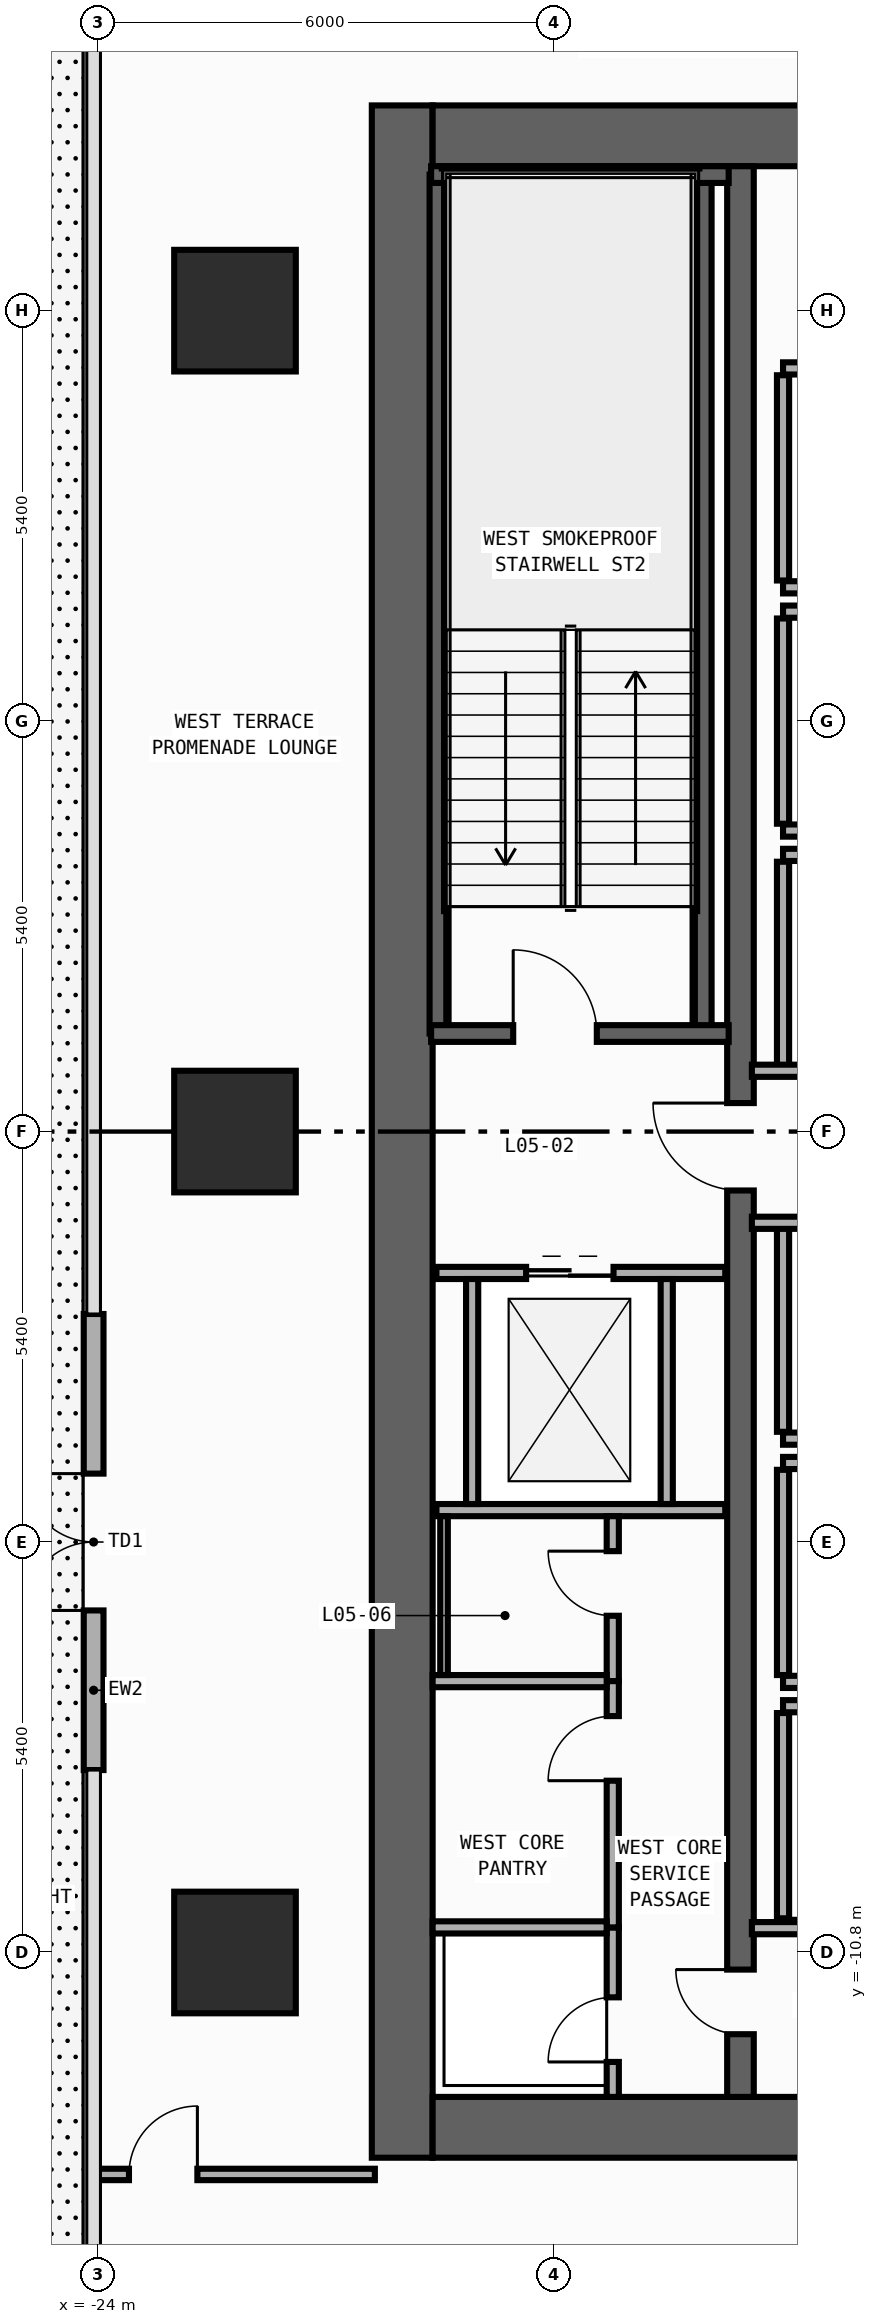
"""IFC4 building model, lengths in metres.
Left out: names, types, materials, properties, quantities, classifications, styles, units other than length and angle.
Written with IfcOpenShell. Run it as: python <this file> out.ifc"""

import sys

from ifc_helpers import new_model, si_unit, direction, frame, frame_2d, origin, origin_2d, place, context, subcontext, project, spatial, rectangle, extrude, element, fill, save


model = new_model("IFC4")
c1 = context("Model", 3, precision=1e-05, world=origin(), true_north=direction((0.0, 1.0)))
c2 = subcontext(c1, "Body", "Model", "MODEL_VIEW")
j1 = project(units=[si_unit("LENGTHUNIT", "METRE"), si_unit("PLANEANGLEUNIT", "RADIAN")], contexts=[c1])
p1 = place(None, origin())
s1 = spatial("IfcSite", under=j1, at=p1, CompositionType="ELEMENT")
p2 = place(p1, origin())
s2 = spatial("IfcBuilding", under=s1, at=p2, CompositionType="ELEMENT")
p3 = place(p2, frame((0.0, 0.0, 21.0)))
s3 = spatial("IfcBuildingStorey", under=s2, at=p3, CompositionType="ELEMENT", Elevation=21.0)
p4 = place(p3, frame((-20.0, -13.5, 0.0), z_axis=(0.0, 0.0, 1.0), x_axis=(0.0, 1.0, 0.0)))
e1 = element("IfcWall", 1, at=p4, inside=s3, PredefinedType="SHEAR", context=c2, shape_type="SweptSolid", body=[
    extrude(rectangle(XDim=27.0, YDim=0.8, at=frame_2d((13.5, 0.0))), origin(), (0.0, 0.0, 1.0), 4.74),
])
for number, where, z_axis, x_axis in (
    (2, (-19.6, -13.1, 0.0), (0.0, 0.0, 1.0), (1.0, 0.0, 0.0)),
    (3, (-19.6, 13.1, 0.0), (0.0, 0.0, 1.0), (1.0, 0.0, 0.0)),
):
    element("IfcWall", number, at=place(p3, frame(where, z_axis=z_axis, x_axis=x_axis)), inside=s3, PredefinedType="SHEAR", context=c2, shape_type="SweptSolid", body=[
        extrude(rectangle(XDim=6.8, YDim=0.8, at=frame_2d((3.4, 0.0))), origin(), (0.0, 0.0, 1.0), 4.74),
    ])
p5 = place(p3, frame((-15.55, -12.7, 0.0), z_axis=(0.0, 0.0, 1.0), x_axis=(0.0, 1.0, 0.0)))
e4 = element("IfcWall", 4, at=p5, inside=s3, PredefinedType="SHEAR", context=c2, shape_type="SweptSolid", body=[
    extrude(rectangle(XDim=25.4, YDim=0.35, at=frame_2d((12.7, 0.0))), origin(), (0.0, 0.0, 1.0), 4.74),
])
p6 = place(p5, frame((11.925, 0.0, 0.0)))
e5 = element("IfcOpeningElement", 5, at=p6, cuts=e4, PredefinedType="OPENING", context=c2, shape_type="SweptSolid", body=[
    extrude(rectangle(XDim=1.15, YDim=2.2, at=frame_2d((0.575, 1.1))), frame((0.0, 0.185, 0.0), z_axis=(0.0, -1.0, 0.0), x_axis=(1.0, 0.0, 0.0)), (0.0, 0.0, 1.0), 0.37),
])
p7 = place(p5, frame((0.825, 0.0, 0.0)))
e6 = element("IfcOpeningElement", 6, at=p7, cuts=e4, PredefinedType="OPENING", context=c2, shape_type="SweptSolid", body=[
    extrude(rectangle(XDim=0.85, YDim=2.1, at=frame_2d((0.425, 1.05))), frame((0.0, 0.185, 0.0), z_axis=(0.0, -1.0, 0.0), x_axis=(1.0, 0.0, 0.0)), (0.0, 0.0, 1.0), 0.37),
])
for number, where, z_axis, x_axis in (
    (7, (-16.04, 1.29, 0.0), (0.0, 0.0, 1.0), (0.0, 1.0, 0.0)),
    (8, (-19.53, 1.29, 0.0), (0.0, 0.0, 1.0), (0.0, 1.0, 0.0)),
):
    element("IfcWall", number, at=place(p3, frame(where, z_axis=z_axis, x_axis=x_axis)), inside=s3, PredefinedType="SHEAR", context=c2, shape_type="SweptSolid", body=[
        extrude(rectangle(XDim=11.3, YDim=0.22, at=frame_2d((5.65, 0.0))), origin(), (0.0, 0.0, 1.0), 4.74),
    ])
p8 = place(p3, frame((-19.62, 12.59, 0.0), z_axis=(0.0, 0.0, 1.0), x_axis=(1.0, 0.0, 0.0)))
e9 = element("IfcWall", 9, at=p8, inside=s3, PredefinedType="SHEAR", context=c2, shape_type="SweptSolid", body=[
    extrude(rectangle(XDim=3.915, YDim=0.22, at=frame_2d((1.958, 0.0))), origin(), (0.0, 0.0, 1.0), 4.74),
])
p9 = place(p3, frame((-19.62, 1.29, 0.0), z_axis=(0.0, 0.0, 1.0), x_axis=(1.0, 0.0, 0.0)))
e10 = element("IfcWall", 10, at=p9, inside=s3, PredefinedType="SHEAR", context=c2, shape_type="SweptSolid", body=[
    extrude(rectangle(XDim=3.915, YDim=0.22, at=frame_2d((1.958, 0.0))), origin(), (0.0, 0.0, 1.0), 4.74),
])
p10 = place(p9, frame((1.08, 0.0, 0.0)))
e11 = element("IfcOpeningElement", 11, at=p10, cuts=e10, PredefinedType="OPENING", context=c2, shape_type="SweptSolid", body=[
    extrude(rectangle(XDim=1.1, YDim=2.2, at=frame_2d((0.55, 1.1))), frame((0.0, 0.12, 0.0), z_axis=(0.0, -1.0, 0.0), x_axis=(1.0, 0.0, 0.0)), (0.0, 0.0, 1.0), 0.24),
])
for number, where, z_axis, x_axis in (
    (12, (-22.2, -10.8, 0.0), (0.0, 0.0, 1.0), (1.0, 0.0, 0.0)),
    (13, (-22.2, 0.0, 0.0), (0.0, 0.0, 1.0), (1.0, 0.0, 0.0)),
    (14, (-22.2, 10.8, 0.0), (0.0, 0.0, 1.0), (1.0, 0.0, 0.0)),
):
    element("IfcColumn", number, at=place(p3, frame(where, z_axis=z_axis, x_axis=x_axis)), inside=s3, PredefinedType="COLUMN", context=c2, shape_type="SweptSolid", body=[
        extrude(rectangle(XDim=1.6, YDim=1.6, at=origin_2d()), origin(), (0.0, 0.0, 1.0), 5.0),
    ])
p11 = place(p3, frame((-24.06, -8.4, 0.0), z_axis=(0.0, 0.0, 1.0), x_axis=(0.0, 1.0, 0.0)))
e15 = element("IfcWall", 15, at=p11, inside=s3, PredefinedType="STANDARD", context=c2, shape_type="SweptSolid", body=[
    extrude(rectangle(XDim=6.0, YDim=0.26, at=frame_2d((3.0, 0.0))), origin(), (0.0, 0.0, 1.0), 4.74),
])
p12 = place(p11, frame((2.1, 0.0, 0.0)))
e16 = element("IfcOpeningElement", 16, at=p12, cuts=e15, PredefinedType="OPENING", context=c2, shape_type="SweptSolid", body=[
    extrude(rectangle(XDim=1.8, YDim=2.3, at=frame_2d((0.9, 1.15))), frame((0.0, 0.14, 0.0), z_axis=(0.0, -1.0, 0.0), x_axis=(1.0, 0.0, 0.0)), (0.0, 0.0, 1.0), 0.28),
])
for number, where, z_axis, x_axis in (
    (17, (-14.99, 7.16, 0.0), (0.0, 0.0, 1.0), (1.0, 0.0, 0.0)),
    (18, (-14.99, 10.04, 0.0), (0.0, 0.0, 1.0), (1.0, 0.0, 0.0)),
):
    element("IfcWall", number, at=place(p3, frame(where, z_axis=z_axis, x_axis=x_axis)), inside=s3, PredefinedType="STANDARD", context=c2, shape_type="SweptSolid", body=[
        extrude(rectangle(XDim=2.19, YDim=0.16, at=frame_2d((1.095, 0.0))), origin(), (0.0, 0.0, 1.0), 4.74),
    ])
p13 = place(p3, frame((-14.99, 7.25, 0.0), z_axis=(0.0, 0.0, 1.0), x_axis=(0.0, 1.0, 0.0)))
e19 = element("IfcWall", 19, at=p13, inside=s3, PredefinedType="STANDARD", context=c2, shape_type="SweptSolid", body=[
    extrude(rectangle(XDim=2.7, YDim=0.16, at=frame_2d((1.35, 0.0))), origin(), (0.0, 0.0, 1.0), 4.74),
])
for number, where, z_axis, x_axis in (
    (20, (-14.99, 3.96, 0.0), (0.0, 0.0, 1.0), (1.0, 0.0, 0.0)),
    (21, (-14.99, 6.84, 0.0), (0.0, 0.0, 1.0), (1.0, 0.0, 0.0)),
):
    element("IfcWall", number, at=place(p3, frame(where, z_axis=z_axis, x_axis=x_axis)), inside=s3, PredefinedType="STANDARD", context=c2, shape_type="SweptSolid", body=[
        extrude(rectangle(XDim=2.19, YDim=0.16, at=frame_2d((1.095, 0.0))), origin(), (0.0, 0.0, 1.0), 4.74),
    ])
p14 = place(p3, frame((-14.99, 4.05, 0.0), z_axis=(0.0, 0.0, 1.0), x_axis=(0.0, 1.0, 0.0)))
e22 = element("IfcWall", 22, at=p14, inside=s3, PredefinedType="STANDARD", context=c2, shape_type="SweptSolid", body=[
    extrude(rectangle(XDim=2.7, YDim=0.16, at=frame_2d((1.35, 0.0))), origin(), (0.0, 0.0, 1.0), 4.74),
])
p15 = place(p3, frame((-14.99, 3.64, 0.0), z_axis=(0.0, 0.0, 1.0), x_axis=(1.0, 0.0, 0.0)))
e23 = element("IfcWall", 23, at=p15, inside=s3, PredefinedType="STANDARD", context=c2, shape_type="SweptSolid", body=[
    extrude(rectangle(XDim=2.19, YDim=0.16, at=frame_2d((1.095, 0.0))), origin(), (0.0, 0.0, 1.0), 4.74),
])
p16 = place(p3, frame((-14.99, 0.85, 0.0), z_axis=(0.0, 0.0, 1.0), x_axis=(0.0, 1.0, 0.0)))
e24 = element("IfcWall", 24, at=p16, inside=s3, PredefinedType="STANDARD", context=c2, shape_type="SweptSolid", body=[
    extrude(rectangle(XDim=2.7, YDim=0.16, at=frame_2d((1.35, 0.0))), origin(), (0.0, 0.0, 1.0), 4.74),
])
p17 = place(p3, frame((-14.99, -4.04, 0.0), z_axis=(0.0, 0.0, 1.0), x_axis=(1.0, 0.0, 0.0)))
e25 = element("IfcWall", 25, at=p17, inside=s3, PredefinedType="STANDARD", context=c2, shape_type="SweptSolid", body=[
    extrude(rectangle(XDim=2.19, YDim=0.16, at=frame_2d((1.095, 0.0))), origin(), (0.0, 0.0, 1.0), 4.74),
])
p18 = place(p3, frame((-14.99, -3.95, 0.0), z_axis=(0.0, 0.0, 1.0), x_axis=(0.0, 1.0, 0.0)))
e26 = element("IfcWall", 26, at=p18, inside=s3, PredefinedType="STANDARD", context=c2, shape_type="SweptSolid", body=[
    extrude(rectangle(XDim=2.7, YDim=0.16, at=frame_2d((1.35, 0.0))), origin(), (0.0, 0.0, 1.0), 4.74),
])
for number, where, z_axis, x_axis in (
    (27, (-14.99, -7.24, 0.0), (0.0, 0.0, 1.0), (1.0, 0.0, 0.0)),
    (28, (-14.99, -4.36, 0.0), (0.0, 0.0, 1.0), (1.0, 0.0, 0.0)),
):
    element("IfcWall", number, at=place(p3, frame(where, z_axis=z_axis, x_axis=x_axis)), inside=s3, PredefinedType="STANDARD", context=c2, shape_type="SweptSolid", body=[
        extrude(rectangle(XDim=2.19, YDim=0.16, at=frame_2d((1.095, 0.0))), origin(), (0.0, 0.0, 1.0), 4.74),
    ])
p19 = place(p3, frame((-14.99, -7.15, 0.0), z_axis=(0.0, 0.0, 1.0), x_axis=(0.0, 1.0, 0.0)))
e29 = element("IfcWall", 29, at=p19, inside=s3, PredefinedType="STANDARD", context=c2, shape_type="SweptSolid", body=[
    extrude(rectangle(XDim=2.7, YDim=0.16, at=frame_2d((1.35, 0.0))), origin(), (0.0, 0.0, 1.0), 4.74),
])
p20 = place(p3, frame((-14.99, -7.56, 0.0), z_axis=(0.0, 0.0, 1.0), x_axis=(1.0, 0.0, 0.0)))
e30 = element("IfcWall", 30, at=p20, inside=s3, PredefinedType="STANDARD", context=c2, shape_type="SweptSolid", body=[
    extrude(rectangle(XDim=2.19, YDim=0.16, at=frame_2d((1.095, 0.0))), origin(), (0.0, 0.0, 1.0), 4.74),
])
p21 = place(p3, frame((-14.99, -10.35, 0.0), z_axis=(0.0, 0.0, 1.0), x_axis=(0.0, 1.0, 0.0)))
e31 = element("IfcWall", 31, at=p21, inside=s3, PredefinedType="STANDARD", context=c2, shape_type="SweptSolid", body=[
    extrude(rectangle(XDim=2.7, YDim=0.16, at=frame_2d((1.35, 0.0))), origin(), (0.0, 0.0, 1.0), 4.74),
])
p22 = place(p3, frame((-19.55, -1.86, 0.0), z_axis=(0.0, 0.0, 1.0), x_axis=(1.0, 0.0, 0.0)))
e32 = element("IfcWall", 32, at=p22, inside=s3, PredefinedType="STANDARD", context=c2, shape_type="SweptSolid", body=[
    extrude(rectangle(XDim=3.8, YDim=0.16, at=frame_2d((1.9, 0.0))), origin(), (0.0, 0.0, 1.0), 4.74),
])
p23 = place(p22, frame((1.18, 0.0, 0.0)))
e33 = element("IfcOpeningElement", 33, at=p23, cuts=e32, PredefinedType="OPENING", context=c2, shape_type="SweptSolid", body=[
    extrude(rectangle(XDim=1.15, YDim=2.2, at=frame_2d((0.575, 1.1))), frame((0.0, 0.09, 0.0), z_axis=(0.0, -1.0, 0.0), x_axis=(1.0, 0.0, 0.0)), (0.0, 0.0, 1.0), 0.18),
])
p24 = place(p3, frame((-19.55, -4.98, 0.0), z_axis=(0.0, 0.0, 1.0), x_axis=(1.0, 0.0, 0.0)))
e34 = element("IfcWall", 34, at=p24, inside=s3, PredefinedType="STANDARD", context=c2, shape_type="SweptSolid", body=[
    extrude(rectangle(XDim=3.8, YDim=0.16, at=frame_2d((1.9, 0.0))), origin(), (0.0, 0.0, 1.0), 4.74),
])
for number, where, z_axis, x_axis in (
    (35, (-19.08, -4.9, 0.0), (0.0, 0.0, 1.0), (0.0, 1.0, 0.0)),
    (36, (-16.52, -4.9, 0.0), (0.0, 0.0, 1.0), (0.0, 1.0, 0.0)),
):
    element("IfcWall", number, at=place(p3, frame(where, z_axis=z_axis, x_axis=x_axis)), inside=s3, PredefinedType="STANDARD", context=c2, shape_type="SweptSolid", body=[
        extrude(rectangle(XDim=2.96, YDim=0.16, at=frame_2d((1.48, 0.0))), origin(), (0.0, 0.0, 1.0), 4.74),
    ])
for number, where, z_axis, x_axis in (
    (37, (-15.4, 0.8, 0.0), (0.0, 0.0, 1.0), (1.0, 0.0, 0.0)),
    (38, (-15.4, -1.2, 0.0), (0.0, 0.0, 1.0), (1.0, 0.0, 0.0)),
    (39, (-15.4, -10.48, 0.0), (0.0, 0.0, 1.0), (1.0, 0.0, 0.0)),
):
    element("IfcWall", number, at=place(p3, frame(where, z_axis=z_axis, x_axis=x_axis)), inside=s3, PredefinedType="STANDARD", context=c2, shape_type="SweptSolid", body=[
        extrude(rectangle(XDim=2.6, YDim=0.16, at=frame_2d((1.3, 0.0))), origin(), (0.0, 0.0, 1.0), 4.74),
    ])
p25 = place(p3, frame((-17.23, -12.7, 0.0), z_axis=(0.0, 0.0, 1.0), x_axis=(0.0, 1.0, 0.0)))
e40 = element("IfcWall", 40, at=p25, inside=s3, PredefinedType="PARTITIONING", context=c2, shape_type="SweptSolid", body=[
    extrude(rectangle(XDim=2.23, YDim=0.16, at=frame_2d((1.115, 0.0))), origin(), (0.0, 0.0, 1.0), 4.74),
])
p26 = place(p25, frame((0.46, 0.0, 0.0)))
e41 = element("IfcOpeningElement", 41, at=p26, cuts=e40, PredefinedType="OPENING", context=c2, shape_type="SweptSolid", body=[
    extrude(rectangle(XDim=0.85, YDim=2.1, at=frame_2d((0.425, 1.05))), frame((0.0, 0.09, 0.0), z_axis=(0.0, -1.0, 0.0), x_axis=(1.0, 0.0, 0.0)), (0.0, 0.0, 1.0), 0.18),
])
p27 = place(p3, frame((-17.23, -7.23, 0.0), z_axis=(0.0, 0.0, 1.0), x_axis=(0.0, 1.0, 0.0)))
e42 = element("IfcWall", 42, at=p27, inside=s3, PredefinedType="PARTITIONING", context=c2, shape_type="SweptSolid", body=[
    extrude(rectangle(XDim=2.17, YDim=0.16, at=frame_2d((1.085, 0.0))), origin(), (0.0, 0.0, 1.0), 4.74),
])
p28 = place(p27, frame((0.86, 0.0, 0.0)))
e43 = element("IfcOpeningElement", 43, at=p28, cuts=e42, PredefinedType="OPENING", context=c2, shape_type="SweptSolid", body=[
    extrude(rectangle(XDim=0.85, YDim=2.1, at=frame_2d((0.425, 1.05))), frame((0.0, 0.09, 0.0), z_axis=(0.0, -1.0, 0.0), x_axis=(1.0, 0.0, 0.0)), (0.0, 0.0, 1.0), 0.18),
])
p29 = place(p3, frame((-17.23, -10.47, 0.0), z_axis=(0.0, 0.0, 1.0), x_axis=(0.0, 1.0, 0.0)))
e44 = element("IfcWall", 44, at=p29, inside=s3, PredefinedType="PARTITIONING", context=c2, shape_type="SweptSolid", body=[
    extrude(rectangle(XDim=3.24, YDim=0.16, at=frame_2d((1.62, 0.0))), origin(), (0.0, 0.0, 1.0), 4.74),
])
p30 = place(p29, frame((1.93, 0.0, 0.0)))
e45 = element("IfcOpeningElement", 45, at=p30, cuts=e44, PredefinedType="OPENING", context=c2, shape_type="SweptSolid", body=[
    extrude(rectangle(XDim=0.85, YDim=2.1, at=frame_2d((0.425, 1.05))), frame((0.0, 0.09, 0.0), z_axis=(0.0, -1.0, 0.0), x_axis=(1.0, 0.0, 0.0)), (0.0, 0.0, 1.0), 0.18),
])
for number, where, z_axis, x_axis in (
    (46, (-19.6, -10.47, 0.0), (0.0, 0.0, 1.0), (1.0, 0.0, 0.0)),
    (47, (-19.6, -7.23, 0.0), (0.0, 0.0, 1.0), (1.0, 0.0, 0.0)),
):
    element("IfcWall", number, at=place(p3, frame(where, z_axis=z_axis, x_axis=x_axis)), inside=s3, PredefinedType="PARTITIONING", context=c2, shape_type="SweptSolid", body=[
        extrude(rectangle(XDim=2.29, YDim=0.16, at=frame_2d((1.145, 0.0))), origin(), (0.0, 0.0, 1.0), 4.74),
    ])
p31 = place(p3, frame((-24.055, -13.72, 0.0), z_axis=(0.0, 0.0, 1.0), x_axis=(1.0, 0.0, 0.0)))
e48 = element("IfcWall", 48, at=p31, inside=s3, PredefinedType="PARTITIONING", context=c2, shape_type="SweptSolid", body=[
    extrude(rectangle(XDim=3.695, YDim=0.15, at=frame_2d((1.847, 0.0))), origin(), (0.0, 0.0, 1.0), 4.74),
])
p32 = place(p31, frame((0.46, 0.0, 0.0)))
e49 = element("IfcOpeningElement", 49, at=p32, cuts=e48, PredefinedType="OPENING", context=c2, shape_type="SweptSolid", body=[
    extrude(rectangle(XDim=0.9, YDim=2.15, at=frame_2d((0.45, 1.075))), frame((0.0, 0.085, 0.0), z_axis=(0.0, -1.0, 0.0), x_axis=(1.0, 0.0, 0.0)), (0.0, 0.0, 1.0), 0.17),
])
p33 = place(p3, frame((-19.45, -7.15, 0.0), z_axis=(0.0, 0.0, 1.0), x_axis=(0.0, 1.0, 0.0)))
e50 = element("IfcWall", 50, at=p33, inside=s3, PredefinedType="PARTITIONING", context=c2, shape_type="SweptSolid", body=[
    extrude(rectangle(XDim=2.09, YDim=0.1, at=frame_2d((1.045, 0.0))), origin(), (0.0, 0.0, 1.0), 4.74),
])
p34 = place(p12, origin())
e51 = element("IfcDoor", 51, at=p34, inside=s3, OperationType="DOUBLE_DOOR_SINGLE_SWING", PredefinedType="DOOR", context=c2, shape_type="SweptSolid", body=[
    extrude(rectangle(XDim=1.8, YDim=2.3, at=frame_2d((0.9, 1.15))), frame((0.0, 0.025, 0.0), z_axis=(0.0, -1.0, 0.0), x_axis=(1.0, 0.0, 0.0)), (0.0, 0.0, 1.0), 0.05),
])
fill(e16, e51)
p35 = place(p10, origin())
e52 = element("IfcDoor", 52, at=p35, inside=s3, OperationType="SINGLE_SWING_LEFT", PredefinedType="DOOR", context=c2, shape_type="SweptSolid", body=[
    extrude(rectangle(XDim=1.1, YDim=2.2, at=frame_2d((0.55, 1.1))), frame((0.0, 0.025, 0.0), z_axis=(0.0, -1.0, 0.0), x_axis=(1.0, 0.0, 0.0)), (0.0, 0.0, 1.0), 0.05),
])
fill(e11, e52)
p36 = place(p6, origin())
e53 = element("IfcDoor", 53, at=p36, inside=s3, OperationType="SINGLE_SWING_RIGHT", PredefinedType="DOOR", context=c2, shape_type="SweptSolid", body=[
    extrude(rectangle(XDim=1.15, YDim=2.2, at=frame_2d((0.575, 1.1))), frame((0.0, 0.025, 0.0), z_axis=(0.0, -1.0, 0.0), x_axis=(1.0, 0.0, 0.0)), (0.0, 0.0, 1.0), 0.05),
])
fill(e5, e53)
p37 = place(p7, origin())
e54 = element("IfcDoor", 54, at=p37, inside=s3, OperationType="SINGLE_SWING_RIGHT", PredefinedType="DOOR", context=c2, shape_type="SweptSolid", body=[
    extrude(rectangle(XDim=0.85, YDim=2.1, at=frame_2d((0.425, 1.05))), frame((0.0, 0.025, 0.0), z_axis=(0.0, -1.0, 0.0), x_axis=(1.0, 0.0, 0.0)), (0.0, 0.0, 1.0), 0.05),
])
fill(e6, e54)
p38 = place(p23, origin())
e55 = element("IfcDoor", 55, at=p38, inside=s3, OperationType="DOUBLE_DOOR_SLIDING", PredefinedType="DOOR", context=c2, shape_type="SweptSolid", body=[
    extrude(rectangle(XDim=1.15, YDim=2.2, at=frame_2d((0.575, 1.1))), frame((0.0, 0.025, 0.0), z_axis=(0.0, -1.0, 0.0), x_axis=(1.0, 0.0, 0.0)), (0.0, 0.0, 1.0), 0.05),
])
fill(e33, e55)
p39 = place(p26, origin())
e56 = element("IfcDoor", 56, at=p39, inside=s3, OperationType="SINGLE_SWING_LEFT", PredefinedType="DOOR", context=c2, shape_type="SweptSolid", body=[
    extrude(rectangle(XDim=0.85, YDim=2.1, at=frame_2d((0.425, 1.05))), frame((0.0, 0.025, 0.0), z_axis=(0.0, -1.0, 0.0), x_axis=(1.0, 0.0, 0.0)), (0.0, 0.0, 1.0), 0.05),
])
fill(e41, e56)
p40 = place(p28, origin())
e57 = element("IfcDoor", 57, at=p40, inside=s3, OperationType="SINGLE_SWING_RIGHT", PredefinedType="DOOR", context=c2, shape_type="SweptSolid", body=[
    extrude(rectangle(XDim=0.85, YDim=2.1, at=frame_2d((0.425, 1.05))), frame((0.0, 0.025, 0.0), z_axis=(0.0, -1.0, 0.0), x_axis=(1.0, 0.0, 0.0)), (0.0, 0.0, 1.0), 0.05),
])
fill(e43, e57)
p41 = place(p30, origin())
e58 = element("IfcDoor", 58, at=p41, inside=s3, OperationType="SINGLE_SWING_LEFT", PredefinedType="DOOR", context=c2, shape_type="SweptSolid", body=[
    extrude(rectangle(XDim=0.85, YDim=2.1, at=frame_2d((0.425, 1.05))), frame((0.0, 0.025, 0.0), z_axis=(0.0, -1.0, 0.0), x_axis=(1.0, 0.0, 0.0)), (0.0, 0.0, 1.0), 0.05),
])
fill(e45, e58)
p42 = place(p32, origin())
e59 = element("IfcDoor", 59, at=p42, inside=s3, OperationType="SINGLE_SWING_RIGHT", PredefinedType="DOOR", context=c2, shape_type="SweptSolid", body=[
    extrude(rectangle(XDim=0.9, YDim=2.15, at=frame_2d((0.45, 1.075))), frame((0.0, 0.025, 0.0), z_axis=(0.0, -1.0, 0.0), x_axis=(1.0, 0.0, 0.0)), (0.0, 0.0, 1.0), 0.05),
])
fill(e49, e59)
save(model, sys.argv[1])
